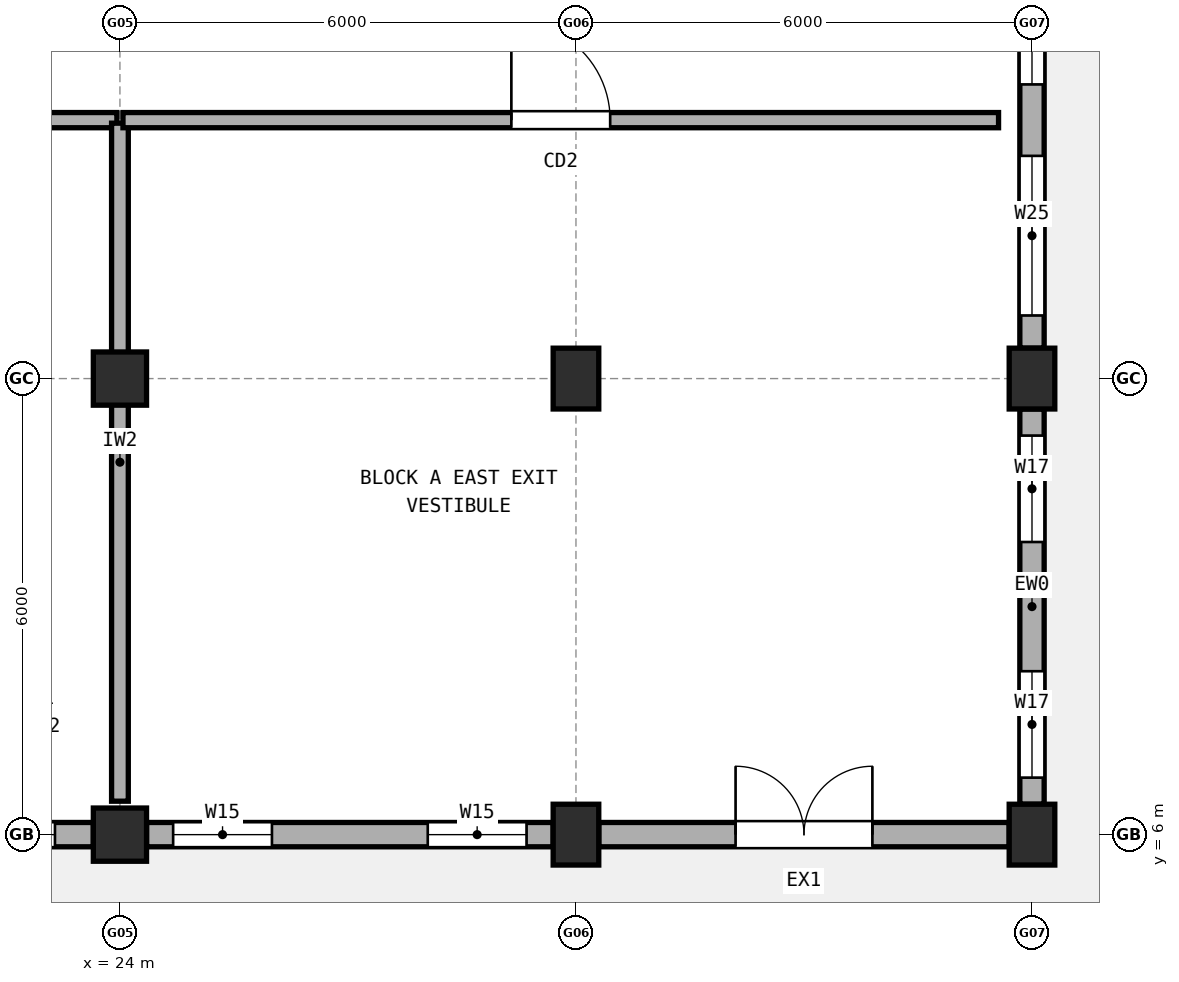
"""IFC4 building model, lengths in metres.
Left out: names, types, materials, properties, quantities, classifications, styles, units other than length and angle.
Written with IfcOpenShell. Run it as: python <this file> out.ifc"""

import sys

from ifc_helpers import new_model, si_unit, direction, frame, frame_2d, origin, origin_2d, place, context, subcontext, project, spatial, rectangle, extrude, element, fill, save


model = new_model("IFC4")
c1 = context("Model", 3, precision=1e-05, world=origin(), true_north=direction((0.0, 1.0)))
c2 = subcontext(c1, "Body", "Model", "MODEL_VIEW")
j1 = project(units=[si_unit("LENGTHUNIT", "METRE"), si_unit("PLANEANGLEUNIT", "RADIAN")], contexts=[c1])
p1 = place(None, origin())
s1 = spatial("IfcSite", under=j1, at=p1, CompositionType="ELEMENT")
p2 = place(p1, origin())
s2 = spatial("IfcBuilding", under=s1, at=p2, CompositionType="ELEMENT")
p3 = place(p2, origin())
s3 = spatial("IfcBuildingStorey", under=s2, at=p3, CompositionType="ELEMENT", Elevation=0.0)
for number, where, z_axis, x_axis in (
    (1, (24.0, 6.0, 0.0), (0.0, 0.0, 1.0), (1.0, 0.0, 0.0)),
    (2, (24.0, 12.0, 0.0), (0.0, 0.0, 1.0), (1.0, 0.0, 0.0)),
):
    element("IfcColumn", number, at=place(p3, frame(where, z_axis=z_axis, x_axis=x_axis)), inside=s3, PredefinedType="COLUMN", context=c2, shape_type="SweptSolid", body=[
        extrude(rectangle(XDim=0.7, YDim=0.7, at=origin_2d()), origin(), (0.0, 0.0, 1.0), 4.23),
    ])
for number, where, z_axis, x_axis in (
    (3, (30.0, 6.0, 0.0), (0.0, 0.0, 1.0), (1.0, 0.0, 0.0)),
    (4, (30.0, 12.0, 0.0), (0.0, 0.0, 1.0), (1.0, 0.0, 0.0)),
    (5, (36.0, 6.0, 0.0), (0.0, 0.0, 1.0), (1.0, 0.0, 0.0)),
    (6, (36.0, 12.0, 0.0), (0.0, 0.0, 1.0), (1.0, 0.0, 0.0)),
):
    element("IfcColumn", number, at=place(p3, frame(where, z_axis=z_axis, x_axis=x_axis)), inside=s3, PredefinedType="COLUMN", context=c2, shape_type="SweptSolid", body=[
        extrude(rectangle(XDim=0.6, YDim=0.8, at=origin_2d()), origin(), (0.0, 0.0, 1.0), 4.23),
    ])
p4 = place(p3, frame((18.35, 6.0, 0.0), z_axis=(0.0, 0.0, 1.0), x_axis=(1.0, 0.0, 0.0)))
e7 = element("IfcWall", 7, at=p4, inside=s3, PredefinedType="STANDARD", context=c2, shape_type="SweptSolid", body=[
    extrude(rectangle(XDim=5.3, YDim=0.32, at=frame_2d((2.65, 0.0))), origin(), (0.0, 0.0, 1.0), 3.112),
])
p5 = place(p4, frame((0.255, 0.0, 0.9)))
e8 = element("IfcOpeningElement", 8, at=p5, cuts=e7, PredefinedType="OPENING", context=c2, shape_type="SweptSolid", body=[
    extrude(rectangle(XDim=2.1, YDim=1.55, at=frame_2d((1.05, 0.775))), frame((0.0, 0.17, 0.0), z_axis=(0.0, -1.0, 0.0), x_axis=(1.0, 0.0, 0.0)), (0.0, 0.0, 1.0), 0.34),
])
p6 = place(p4, frame((3.195, 0.0, 0.9)))
e9 = element("IfcOpeningElement", 9, at=p6, cuts=e7, PredefinedType="OPENING", context=c2, shape_type="SweptSolid", body=[
    extrude(rectangle(XDim=1.6, YDim=1.5, at=frame_2d((0.8, 0.75))), frame((0.0, 0.17, 0.0), z_axis=(0.0, -1.0, 0.0), x_axis=(1.0, 0.0, 0.0)), (0.0, 0.0, 1.0), 0.34),
])
p7 = place(p3, frame((24.35, 6.0, 0.0), z_axis=(0.0, 0.0, 1.0), x_axis=(1.0, 0.0, 0.0)))
e10 = element("IfcWall", 10, at=p7, inside=s3, PredefinedType="STANDARD", context=c2, shape_type="SweptSolid", body=[
    extrude(rectangle(XDim=5.35, YDim=0.32, at=frame_2d((2.675, 0.0))), origin(), (0.0, 0.0, 1.0), 3.112),
])
p8 = place(p7, frame((0.35, 0.0, 0.9)))
e11 = element("IfcOpeningElement", 11, at=p8, cuts=e10, PredefinedType="OPENING", context=c2, shape_type="SweptSolid", body=[
    extrude(rectangle(XDim=1.3, YDim=1.45, at=frame_2d((0.65, 0.725))), frame((0.0, 0.17, 0.0), z_axis=(0.0, -1.0, 0.0), x_axis=(1.0, 0.0, 0.0)), (0.0, 0.0, 1.0), 0.34),
])
p9 = place(p7, frame((3.7, 0.0, 0.9)))
e12 = element("IfcOpeningElement", 12, at=p9, cuts=e10, PredefinedType="OPENING", context=c2, shape_type="SweptSolid", body=[
    extrude(rectangle(XDim=1.3, YDim=1.45, at=frame_2d((0.65, 0.725))), frame((0.0, 0.17, 0.0), z_axis=(0.0, -1.0, 0.0), x_axis=(1.0, 0.0, 0.0)), (0.0, 0.0, 1.0), 0.34),
])
p10 = place(p3, frame((30.3, 6.0, 0.0), z_axis=(0.0, 0.0, 1.0), x_axis=(1.0, 0.0, 0.0)))
e13 = element("IfcWall", 13, at=p10, inside=s3, PredefinedType="STANDARD", context=c2, shape_type="SweptSolid", body=[
    extrude(rectangle(XDim=5.4, YDim=0.32, at=frame_2d((2.7, 0.0))), origin(), (0.0, 0.0, 1.0), 3.112),
])
p11 = place(p10, frame((1.8, 0.0, 0.0)))
e14 = element("IfcOpeningElement", 14, at=p11, cuts=e13, PredefinedType="OPENING", context=c2, shape_type="SweptSolid", body=[
    extrude(rectangle(XDim=1.8, YDim=2.2, at=frame_2d((0.9, 1.1))), frame((0.0, 0.17, 0.0), z_axis=(0.0, -1.0, 0.0), x_axis=(1.0, 0.0, 0.0)), (0.0, 0.0, 1.0), 0.34),
])
p12 = place(p3, frame((36.0, 6.4, 0.0), z_axis=(0.0, 0.0, 1.0), x_axis=(0.0, 1.0, 0.0)))
e15 = element("IfcWall", 15, at=p12, inside=s3, PredefinedType="STANDARD", context=c2, shape_type="SweptSolid", body=[
    extrude(rectangle(XDim=5.2, YDim=0.32, at=frame_2d((2.6, 0.0))), origin(), (0.0, 0.0, 1.0), 3.712),
])
p13 = place(p12, frame((0.35, 0.0, 0.9)))
e16 = element("IfcOpeningElement", 16, at=p13, cuts=e15, PredefinedType="OPENING", context=c2, shape_type="SweptSolid", body=[
    extrude(rectangle(XDim=1.4, YDim=1.5, at=frame_2d((0.7, 0.75))), frame((0.0, 0.17, 0.0), z_axis=(0.0, -1.0, 0.0), x_axis=(1.0, 0.0, 0.0)), (0.0, 0.0, 1.0), 0.34),
])
p14 = place(p12, frame((3.45, 0.0, 0.9)))
e17 = element("IfcOpeningElement", 17, at=p14, cuts=e15, PredefinedType="OPENING", context=c2, shape_type="SweptSolid", body=[
    extrude(rectangle(XDim=1.4, YDim=1.5, at=frame_2d((0.7, 0.75))), frame((0.0, 0.17, 0.0), z_axis=(0.0, -1.0, 0.0), x_axis=(1.0, 0.0, 0.0)), (0.0, 0.0, 1.0), 0.34),
])
p15 = place(p3, frame((36.0, 12.4, 0.0), z_axis=(0.0, 0.0, 1.0), x_axis=(0.0, 1.0, 0.0)))
e18 = element("IfcWall", 18, at=p15, inside=s3, PredefinedType="STANDARD", context=c2, shape_type="SweptSolid", body=[
    extrude(rectangle(XDim=5.2, YDim=0.32, at=frame_2d((2.6, 0.0))), origin(), (0.0, 0.0, 1.0), 3.712),
])
p16 = place(p15, frame((0.43, 0.0, 0.9)))
e19 = element("IfcOpeningElement", 19, at=p16, cuts=e18, PredefinedType="OPENING", context=c2, shape_type="SweptSolid", body=[
    extrude(rectangle(XDim=2.1, YDim=1.55, at=frame_2d((1.05, 0.775))), frame((0.0, 0.17, 0.0), z_axis=(0.0, -1.0, 0.0), x_axis=(1.0, 0.0, 0.0)), (0.0, 0.0, 1.0), 0.34),
])
p17 = place(p15, frame((3.47, 0.0, 0.9)))
e20 = element("IfcOpeningElement", 20, at=p17, cuts=e18, PredefinedType="OPENING", context=c2, shape_type="SweptSolid", body=[
    extrude(rectangle(XDim=1.3, YDim=1.45, at=frame_2d((0.65, 0.725))), frame((0.0, 0.17, 0.0), z_axis=(0.0, -1.0, 0.0), x_axis=(1.0, 0.0, 0.0)), (0.0, 0.0, 1.0), 0.34),
])
p18 = place(p3, frame((21.04, 15.4, 0.0), z_axis=(0.0, 0.0, 1.0), x_axis=(1.0, 0.0, 0.0)))
e21 = element("IfcWall", 21, at=p18, inside=s3, PredefinedType="SOLIDWALL", context=c2, shape_type="SweptSolid", body=[
    extrude(rectangle(XDim=2.92, YDim=0.2, at=frame_2d((1.46, 0.0))), origin(), (0.0, 0.0, 1.0), 3.612),
])
p19 = place(p3, frame((24.0, 6.44, 0.0), z_axis=(0.0, 0.0, 1.0), x_axis=(0.0, 1.0, 0.0)))
e22 = element("IfcWall", 22, at=p19, inside=s3, PredefinedType="SOLIDWALL", context=c2, shape_type="SweptSolid", body=[
    extrude(rectangle(XDim=8.92, YDim=0.22, at=frame_2d((4.46, 0.0))), origin(), (0.0, 0.0, 1.0), 3.612),
])
p20 = place(p3, frame((24.04, 15.4, 0.0), z_axis=(0.0, 0.0, 1.0), x_axis=(1.0, 0.0, 0.0)))
e23 = element("IfcWall", 23, at=p20, inside=s3, PredefinedType="SOLIDWALL", context=c2, shape_type="SweptSolid", body=[
    extrude(rectangle(XDim=11.52, YDim=0.2, at=frame_2d((5.76, 0.0))), origin(), (0.0, 0.0, 1.0), 3.612),
])
p21 = place(p20, frame((5.11, 0.0, 0.0)))
e24 = element("IfcOpeningElement", 24, at=p21, cuts=e23, PredefinedType="OPENING", context=c2, shape_type="SweptSolid", body=[
    extrude(rectangle(XDim=1.3, YDim=2.15, at=frame_2d((0.65, 1.075))), frame((0.0, 0.11, 0.0), z_axis=(0.0, -1.0, 0.0), x_axis=(1.0, 0.0, 0.0)), (0.0, 0.0, 1.0), 0.22),
])
p22 = place(p6, origin())
e25 = element("IfcWindow", 25, at=p22, inside=s3, PartitioningType="SINGLE_PANEL", PredefinedType="WINDOW", context=c2, shape_type="SweptSolid", body=[
    extrude(rectangle(XDim=1.6, YDim=1.5, at=frame_2d((0.8, 0.75))), frame((0.0, 0.03, 0.0), z_axis=(0.0, -1.0, 0.0), x_axis=(1.0, 0.0, 0.0)), (0.0, 0.0, 1.0), 0.06),
])
fill(e9, e25)
p23 = place(p8, origin())
e26 = element("IfcWindow", 26, at=p23, inside=s3, PartitioningType="SINGLE_PANEL", PredefinedType="WINDOW", context=c2, shape_type="SweptSolid", body=[
    extrude(rectangle(XDim=1.3, YDim=1.45, at=frame_2d((0.65, 0.725))), frame((0.0, 0.03, 0.0), z_axis=(0.0, -1.0, 0.0), x_axis=(1.0, 0.0, 0.0)), (0.0, 0.0, 1.0), 0.06),
])
fill(e11, e26)
p24 = place(p9, origin())
e27 = element("IfcWindow", 27, at=p24, inside=s3, PartitioningType="SINGLE_PANEL", PredefinedType="WINDOW", context=c2, shape_type="SweptSolid", body=[
    extrude(rectangle(XDim=1.3, YDim=1.45, at=frame_2d((0.65, 0.725))), frame((0.0, 0.03, 0.0), z_axis=(0.0, -1.0, 0.0), x_axis=(1.0, 0.0, 0.0)), (0.0, 0.0, 1.0), 0.06),
])
fill(e12, e27)
p25 = place(p11, frame((1.8, 0.0, 0.0), z_axis=(0.0, 0.0, 1.0), x_axis=(-1.0, 0.0, 0.0)))
e28 = element("IfcDoor", 28, at=p25, inside=s3, OperationType="DOUBLE_DOOR_SINGLE_SWING", PredefinedType="DOOR", context=c2, shape_type="SweptSolid", body=[
    extrude(rectangle(XDim=1.8, YDim=2.2, at=frame_2d((0.9, 1.1))), frame((0.0, 0.025, 0.0), z_axis=(0.0, -1.0, 0.0), x_axis=(1.0, 0.0, 0.0)), (0.0, 0.0, 1.0), 0.05),
])
fill(e14, e28)
p26 = place(p13, origin())
e29 = element("IfcWindow", 29, at=p26, inside=s3, PartitioningType="SINGLE_PANEL", PredefinedType="WINDOW", context=c2, shape_type="SweptSolid", body=[
    extrude(rectangle(XDim=1.4, YDim=1.5, at=frame_2d((0.7, 0.75))), frame((0.0, 0.03, 0.0), z_axis=(0.0, -1.0, 0.0), x_axis=(1.0, 0.0, 0.0)), (0.0, 0.0, 1.0), 0.06),
])
fill(e16, e29)
p27 = place(p14, origin())
e30 = element("IfcWindow", 30, at=p27, inside=s3, PartitioningType="SINGLE_PANEL", PredefinedType="WINDOW", context=c2, shape_type="SweptSolid", body=[
    extrude(rectangle(XDim=1.4, YDim=1.5, at=frame_2d((0.7, 0.75))), frame((0.0, 0.03, 0.0), z_axis=(0.0, -1.0, 0.0), x_axis=(1.0, 0.0, 0.0)), (0.0, 0.0, 1.0), 0.06),
])
fill(e17, e30)
p28 = place(p16, origin())
e31 = element("IfcWindow", 31, at=p28, inside=s3, PartitioningType="SINGLE_PANEL", PredefinedType="WINDOW", context=c2, shape_type="SweptSolid", body=[
    extrude(rectangle(XDim=2.1, YDim=1.55, at=frame_2d((1.05, 0.775))), frame((0.0, 0.03, 0.0), z_axis=(0.0, -1.0, 0.0), x_axis=(1.0, 0.0, 0.0)), (0.0, 0.0, 1.0), 0.06),
])
fill(e19, e31)
p29 = place(p17, origin())
e32 = element("IfcWindow", 32, at=p29, inside=s3, PartitioningType="SINGLE_PANEL", PredefinedType="WINDOW", context=c2, shape_type="SweptSolid", body=[
    extrude(rectangle(XDim=1.3, YDim=1.45, at=frame_2d((0.65, 0.725))), frame((0.0, 0.03, 0.0), z_axis=(0.0, -1.0, 0.0), x_axis=(1.0, 0.0, 0.0)), (0.0, 0.0, 1.0), 0.06),
])
fill(e20, e32)
p30 = place(p21, origin())
e33 = element("IfcDoor", 33, at=p30, inside=s3, OperationType="SINGLE_SWING_LEFT", PredefinedType="DOOR", context=c2, shape_type="SweptSolid", body=[
    extrude(rectangle(XDim=1.3, YDim=2.15, at=frame_2d((0.65, 1.075))), frame((0.0, 0.025, 0.0), z_axis=(0.0, -1.0, 0.0), x_axis=(1.0, 0.0, 0.0)), (0.0, 0.0, 1.0), 0.05),
])
fill(e24, e33)
save(model, sys.argv[1])
